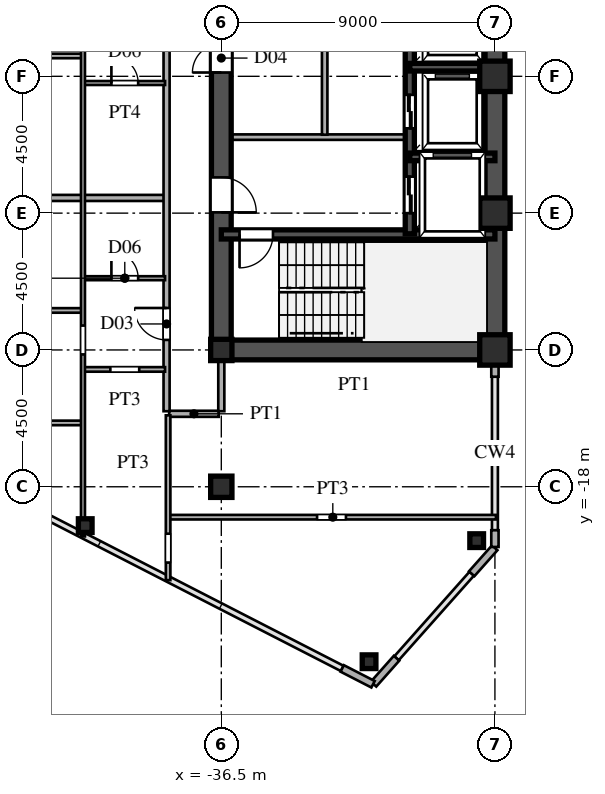
"""IFC4 building model, lengths in metres.
Left out: names, types, materials, properties, quantities, classifications, styles, units other than length and angle.
Written with IfcOpenShell. Run it as: python <this file> out.ifc"""

import sys

from ifc_helpers import new_model, si_unit, direction, frame, frame_2d, origin, origin_2d, place, context, subcontext, project, spatial, rectangle, hollow_rectangle, i_section, extrude, source, transform, mapped, element, fill, save


model = new_model("IFC4")
c1 = context("Model", 3, precision=1e-05, world=origin(), true_north=direction((0.0, 1.0)))
c2 = subcontext(c1, "Body", "Model", "MODEL_VIEW")
j1 = project(units=[si_unit("LENGTHUNIT", "METRE"), si_unit("PLANEANGLEUNIT", "RADIAN")], contexts=[c1])
p1 = place(None, origin())
s1 = spatial("IfcSite", under=j1, at=p1, CompositionType="ELEMENT")
p2 = place(p1, origin())
s2 = spatial("IfcBuilding", under=s1, at=p2, CompositionType="ELEMENT")
p3 = place(p2, frame((0.0, 0.0, 110.4)))
s3 = spatial("IfcBuildingStorey", under=s2, at=p3, CompositionType="ELEMENT", Elevation=110.4)
m1 = source(origin(), c2, "Body", "SweptSolid", [
    extrude(hollow_rectangle(XDim=1.0, YDim=1.0, WallThickness=0.042, at=origin_2d()), origin(), (0.0, 0.0, 1.0), 3.6),
])
for number, where, z_axis, x_axis in (
    (1, (-27.5, -13.5, 0.0), (0.0, 0.0, 1.0), (1.0, 0.0, 0.0)),
    (2, (-27.5, -9.0, 0.0), (0.0, 0.0, 1.0), (1.0, 0.0, 0.0)),
    (3, (-27.5, -4.5, 0.0), (0.0, 0.0, 1.0), (1.0, 0.0, 0.0)),
):
    element("IfcColumn", number, at=place(p3, frame(where, z_axis=z_axis, x_axis=x_axis)), inside=s3, PredefinedType="COLUMN", context=c2, shape_type="MappedRepresentation", body=[
        mapped(m1, transform((0.0, 0.0, 0.0), scale=1.0)),
    ])
m2 = source(origin(), c2, "Body", "SweptSolid", [
    extrude(i_section(OverallWidth=0.7, OverallDepth=0.7, WebThickness=0.028, FlangeThickness=0.045, at=origin_2d()), origin(), (0.0, 0.0, 1.0), 3.6),
])
for number, where, z_axis, x_axis in (
    (4, (-36.5, -18.0, 0.0), (0.0, 0.0, 1.0), (1.0, 0.0, 0.0)),
    (5, (-36.5, -13.5, 0.0), (0.0, 0.0, 1.0), (1.0, 0.0, 0.0)),
):
    element("IfcColumn", number, at=place(p3, frame(where, z_axis=z_axis, x_axis=x_axis)), inside=s3, PredefinedType="COLUMN", context=c2, shape_type="MappedRepresentation", body=[
        mapped(m2, transform((0.0, 0.0, 0.0), scale=1.0)),
    ])
m3 = source(origin(), c2, "Body", "SweptSolid", [
    extrude(hollow_rectangle(XDim=0.45, YDim=0.45, WallThickness=0.018, at=origin_2d()), origin(), (0.0, 0.0, 1.0), 3.6),
])
for number, where, z_axis, x_axis in (
    (6, (-28.1, -19.772, 0.0), (0.0, 0.0, 1.0), (1.0, 0.0, 0.0)),
    (7, (-31.64, -23.754, 0.0), (0.0, 0.0, 1.0), (1.0, 0.0, 0.0)),
    (8, (-40.976, -19.278, 0.0), (0.0, 0.0, 1.0), (1.0, 0.0, 0.0)),
):
    element("IfcColumn", number, at=place(p3, frame(where, z_axis=z_axis, x_axis=x_axis)), inside=s3, PredefinedType="COLUMN", context=c2, shape_type="MappedRepresentation", body=[
        mapped(m3, transform((0.0, 0.0, 0.0), scale=1.0)),
    ])
p4 = place(p3, frame((-27.5, -19.98, 0.0), z_axis=(0.0, 0.0, 1.0), x_axis=(0.0, 1.0, 0.0)))
e9 = element("IfcWall", 9, at=p4, inside=s3, PredefinedType="SOLIDWALL", context=c2, shape_type="SweptSolid", body=[
    extrude(rectangle(XDim=0.55, YDim=0.24, at=frame_2d((0.275, 0.0))), origin(), (0.0, 0.0, 1.0), 3.38),
])
p5 = place(p3, frame((-27.5, -14.38, 0.0), z_axis=(0.0, 0.0, 1.0), x_axis=(0.0, 1.0, 0.0)))
e10 = element("IfcWall", 10, at=p5, inside=s3, PredefinedType="SOLIDWALL", context=c2, shape_type="SweptSolid", body=[
    extrude(rectangle(XDim=0.55, YDim=0.24, at=frame_2d((0.275, 0.0))), origin(), (0.0, 0.0, 1.0), 2.88),
])
p6 = place(p3, frame((-32.523, -23.975, 0.0), z_axis=(0.0, 0.0, 1.0), x_axis=(0.889797395748, -0.456355776255, 0.0)))
e11 = element("IfcWall", 11, at=p6, inside=s3, PredefinedType="SOLIDWALL", context=c2, shape_type="SweptSolid", body=[
    extrude(rectangle(XDim=1.14, YDim=0.24, at=frame_2d((0.57, 0.0))), origin(), (0.0, 0.0, 1.0), 3.38),
])
for number, where, z_axis, x_axis in (
    (12, (-31.493, -24.492, 0.0), (0.0, 0.0, 1.0), (0.664, 0.747, 0.0)),
    (13, (-28.264, -20.86, 0.0), (0.0, 0.0, 1.0), (0.664, 0.747, 0.0)),
):
    element("IfcWall", number, at=place(p3, frame(where, z_axis=z_axis, x_axis=x_axis)), inside=s3, PredefinedType="SOLIDWALL", context=c2, shape_type="SweptSolid", body=[
        extrude(rectangle(XDim=1.14, YDim=0.24, at=frame_2d((0.57, 0.0))), origin(), (0.0, 0.0, 1.0), 3.38),
    ])
p7 = place(p3, frame((-27.5, -13.5, 0.0), z_axis=(0.0, 0.0, 1.0), x_axis=(0.0, 1.0, 0.0)))
e14 = element("IfcWall", 14, at=p7, inside=s3, PredefinedType="SHEAR", context=c2, shape_type="SweptSolid", body=[
    extrude(rectangle(XDim=12.2, YDim=0.65, at=frame_2d((6.1, 0.0))), origin(), (0.0, 0.0, 1.0), 3.38),
])
p8 = place(p3, frame((-36.5, -13.5, 0.0), z_axis=(0.0, 0.0, 1.0), x_axis=(1.0, 0.0, 0.0)))
e15 = element("IfcWall", 15, at=p8, inside=s3, PredefinedType="SHEAR", context=c2, shape_type="SweptSolid", body=[
    extrude(rectangle(XDim=9.0, YDim=0.65, at=frame_2d((4.5, 0.0))), origin(), (0.0, 0.0, 1.0), 3.38),
])
p9 = place(p3, frame((-36.5, -13.65, 0.0), z_axis=(0.0, 0.0, 1.0), x_axis=(0.0, 1.0, 0.0)))
e16 = element("IfcWall", 16, at=p9, inside=s3, PredefinedType="SHEAR", context=c2, shape_type="SweptSolid", body=[
    extrude(rectangle(XDim=7.15, YDim=0.65, at=frame_2d((3.575, 0.0))), origin(), (0.0, 0.0, 1.0), 3.38),
])
p10 = place(p9, frame((4.675, 0.0, 0.0)))
e17 = element("IfcOpeningElement", 17, at=p10, cuts=e16, PredefinedType="OPENING", context=c2, shape_type="SweptSolid", body=[
    extrude(rectangle(XDim=1.15, YDim=2.2, at=frame_2d((0.575, 1.1))), frame((0.0, 0.335, 0.0), z_axis=(0.0, -1.0, 0.0), x_axis=(1.0, 0.0, 0.0)), (0.0, 0.0, 1.0), 0.67),
])
p11 = place(p3, frame((-36.5, -6.5, 0.0), z_axis=(0.0, 0.0, 1.0), x_axis=(0.0, 1.0, 0.0)))
e18 = element("IfcWall", 18, at=p11, inside=s3, PredefinedType="SHEAR", context=c2, shape_type="SweptSolid", body=[
    extrude(rectangle(XDim=5.2, YDim=0.65, at=frame_2d((2.6, 0.0))), origin(), (0.0, 0.0, 1.0), 3.38),
])
p12 = place(p11, frame((2.125, 0.0, 0.0)))
e19 = element("IfcOpeningElement", 19, at=p12, cuts=e18, PredefinedType="OPENING", context=c2, shape_type="SweptSolid", body=[
    extrude(rectangle(XDim=0.95, YDim=2.15, at=frame_2d((0.475, 1.075))), frame((0.0, 0.335, 0.0), z_axis=(0.0, -1.0, 0.0), x_axis=(1.0, 0.0, 0.0)), (0.0, 0.0, 1.0), 0.67),
])
p13 = place(p3, frame((-36.5, -9.7, 0.0), z_axis=(0.0, 0.0, 1.0), x_axis=(1.0, 0.0, 0.0)))
e20 = element("IfcWall", 20, at=p13, inside=s3, PredefinedType="SHEAR", context=c2, shape_type="SweptSolid", body=[
    extrude(rectangle(XDim=9.0, YDim=0.3, at=frame_2d((4.5, 0.0))), origin(), (0.0, 0.0, 1.0), 3.38),
])
p14 = place(p13, frame((0.6, 0.0, 0.0)))
e21 = element("IfcOpeningElement", 21, at=p14, cuts=e20, PredefinedType="OPENING", context=c2, shape_type="SweptSolid", body=[
    extrude(rectangle(XDim=1.1, YDim=2.2, at=frame_2d((0.55, 1.1))), frame((0.0, 0.16, 0.0), z_axis=(0.0, -1.0, 0.0), x_axis=(1.0, 0.0, 0.0)), (0.0, 0.0, 1.0), 0.32),
])
for number, where, z_axis, x_axis in (
    (22, (-30.3, -7.15, 0.0), (0.0, 0.0, 1.0), (1.0, 0.0, 0.0)),
    (23, (-30.3, -4.2, 0.0), (0.0, 0.0, 1.0), (1.0, 0.0, 0.0)),
):
    element("IfcWall", number, at=place(p3, frame(where, z_axis=z_axis, x_axis=x_axis)), inside=s3, PredefinedType="SHEAR", context=c2, shape_type="SweptSolid", body=[
        extrude(rectangle(XDim=2.8, YDim=0.25, at=frame_2d((1.4, 0.0))), origin(), (0.0, 0.0, 1.0), 3.38),
    ])
p15 = place(p3, frame((-30.3, -9.68, 0.0), z_axis=(0.0, 0.0, 1.0), x_axis=(0.0, 1.0, 0.0)))
e24 = element("IfcWall", 24, at=p15, inside=s3, PredefinedType="SHEAR", context=c2, shape_type="SweptSolid", body=[
    extrude(rectangle(XDim=2.56, YDim=0.3, at=frame_2d((1.28, 0.0))), origin(), (0.0, 0.0, 1.0), 3.38),
])
p16 = place(p15, frame((0.68, 0.0, 0.0)))
e25 = element("IfcOpeningElement", 25, at=p16, cuts=e24, PredefinedType="OPENING", context=c2, shape_type="SweptSolid", body=[
    extrude(rectangle(XDim=1.2, YDim=2.25, at=frame_2d((0.6, 1.125))), frame((0.0, 0.16, 0.0), z_axis=(0.0, -1.0, 0.0), x_axis=(1.0, 0.0, 0.0)), (0.0, 0.0, 1.0), 0.32),
])
p17 = place(p3, frame((-30.3, -7.12, 0.0), z_axis=(0.0, 0.0, 1.0), x_axis=(0.0, 1.0, 0.0)))
e26 = element("IfcWall", 26, at=p17, inside=s3, PredefinedType="SHEAR", context=c2, shape_type="SweptSolid", body=[
    extrude(rectangle(XDim=2.92, YDim=0.3, at=frame_2d((1.46, 0.0))), origin(), (0.0, 0.0, 1.0), 3.38),
])
p18 = place(p17, frame((0.91, 0.0, 0.0)))
e27 = element("IfcOpeningElement", 27, at=p18, cuts=e26, PredefinedType="OPENING", context=c2, shape_type="SweptSolid", body=[
    extrude(rectangle(XDim=1.1, YDim=2.2, at=frame_2d((0.55, 1.1))), frame((0.0, 0.16, 0.0), z_axis=(0.0, -1.0, 0.0), x_axis=(1.0, 0.0, 0.0)), (0.0, 0.0, 1.0), 0.32),
])
p19 = place(p3, frame((-30.3, -4.2, 0.0), z_axis=(0.0, 0.0, 1.0), x_axis=(0.0, 1.0, 0.0)))
e28 = element("IfcWall", 28, at=p19, inside=s3, PredefinedType="SHEAR", context=c2, shape_type="SweptSolid", body=[
    extrude(rectangle(XDim=2.88, YDim=0.3, at=frame_2d((1.44, 0.0))), origin(), (0.0, 0.0, 1.0), 3.38),
])
p20 = place(p19, frame((0.89, 0.0, 0.0)))
e29 = element("IfcOpeningElement", 29, at=p20, cuts=e28, PredefinedType="OPENING", context=c2, shape_type="SweptSolid", body=[
    extrude(rectangle(XDim=1.1, YDim=2.2, at=frame_2d((0.55, 1.1))), frame((0.0, 0.16, 0.0), z_axis=(0.0, -1.0, 0.0), x_axis=(1.0, 0.0, 0.0)), (0.0, 0.0, 1.0), 0.32),
])
p21 = place(p3, frame((-36.15, -6.5, 0.0), z_axis=(0.0, 0.0, 1.0), x_axis=(1.0, 0.0, 0.0)))
e30 = element("IfcWall", 30, at=p21, inside=s3, PredefinedType="PARTITIONING", context=c2, shape_type="SweptSolid", body=[
    extrude(rectangle(XDim=5.7, YDim=0.18, at=frame_2d((2.85, 0.0))), origin(), (0.0, 0.0, 1.0), 3.38),
])
p22 = place(p3, frame((-33.1, -6.42, 0.0), z_axis=(0.0, 0.0, 1.0), x_axis=(0.0, 1.0, 0.0)))
e31 = element("IfcWall", 31, at=p22, inside=s3, PredefinedType="PARTITIONING", context=c2, shape_type="SweptSolid", body=[
    extrude(rectangle(XDim=5.04, YDim=0.18, at=frame_2d((2.52, 0.0))), origin(), (0.0, 0.0, 1.0), 3.38),
])
p23 = place(p3, frame((-38.2, -19.0, 0.0), z_axis=(0.0, 0.0, 1.0), x_axis=(1.0, 0.0, 0.0)))
e32 = element("IfcWall", 32, at=p23, inside=s3, PredefinedType="PARTITIONING", context=c2, shape_type="SweptSolid", body=[
    extrude(rectangle(XDim=10.735, YDim=0.15, at=frame_2d((5.367, 0.0))), origin(), (0.0, 0.0, 1.0), 3.38),
])
p24 = place(p23, frame((4.85, 0.0, 0.0)))
e33 = element("IfcOpeningElement", 33, at=p24, cuts=e32, PredefinedType="OPENING", context=c2, shape_type="SweptSolid", body=[
    extrude(rectangle(XDim=0.95, YDim=2.15, at=frame_2d((0.475, 1.075))), frame((0.0, 0.085, 0.0), z_axis=(0.0, -1.0, 0.0), x_axis=(1.0, 0.0, 0.0)), (0.0, 0.0, 1.0), 0.17),
])
p25 = place(p3, frame((-48.295, -15.9, 0.0), z_axis=(0.0, 0.0, 1.0), x_axis=(1.0, 0.0, 0.0)))
e34 = element("IfcWall", 34, at=p25, inside=s3, PredefinedType="PARTITIONING", context=c2, shape_type="SweptSolid", body=[
    extrude(rectangle(XDim=7.195, YDim=0.15, at=frame_2d((3.597, 0.0))), origin(), (0.0, 0.0, 1.0), 3.38),
])
p26 = place(p25, frame((3.165, 0.0, 0.0)))
e35 = element("IfcOpeningElement", 35, at=p26, cuts=e34, PredefinedType="OPENING", context=c2, shape_type="SweptSolid", body=[
    extrude(rectangle(XDim=0.95, YDim=2.15, at=frame_2d((0.475, 1.075))), frame((0.0, 0.085, 0.0), z_axis=(0.0, -1.0, 0.0), x_axis=(1.0, 0.0, 0.0)), (0.0, 0.0, 1.0), 0.17),
])
p27 = place(p3, frame((-38.215, -15.6, 0.0), z_axis=(0.0, 0.0, 1.0), x_axis=(1.0, 0.0, 0.0)))
e36 = element("IfcWall", 36, at=p27, inside=s3, PredefinedType="PARTITIONING", context=c2, shape_type="SweptSolid", body=[
    extrude(rectangle(XDim=1.63, YDim=0.2, at=frame_2d((0.815, 0.0))), origin(), (0.0, 0.0, 1.0), 3.38),
])
p28 = place(p3, frame((-41.0, -14.14, 0.0), z_axis=(0.0, 0.0, 1.0), x_axis=(1.0, 0.0, 0.0)))
e37 = element("IfcWall", 37, at=p28, inside=s3, PredefinedType="PARTITIONING", context=c2, shape_type="SweptSolid", body=[
    extrude(rectangle(XDim=2.65, YDim=0.15, at=frame_2d((1.325, 0.0))), origin(), (0.0, 0.0, 1.0), 3.38),
])
p29 = place(p28, frame((0.85, 0.0, 0.0)))
e38 = element("IfcOpeningElement", 38, at=p29, cuts=e37, PredefinedType="OPENING", context=c2, shape_type="SweptSolid", body=[
    extrude(rectangle(XDim=0.95, YDim=2.15, at=frame_2d((0.475, 1.075))), frame((0.0, 0.085, 0.0), z_axis=(0.0, -1.0, 0.0), x_axis=(1.0, 0.0, 0.0)), (0.0, 0.0, 1.0), 0.17),
])
p30 = place(p3, frame((-54.45, -12.2, 0.0), z_axis=(0.0, 0.0, 1.0), x_axis=(1.0, 0.0, 0.0)))
e39 = element("IfcWall", 39, at=p30, inside=s3, PredefinedType="PARTITIONING", context=c2, shape_type="SweptSolid", body=[
    extrude(rectangle(XDim=13.35, YDim=0.15, at=frame_2d((6.675, 0.0))), origin(), (0.0, 0.0, 1.0), 3.38),
])
p31 = place(p30, frame((6.2, 0.0, 0.0)))
e40 = element("IfcOpeningElement", 40, at=p31, cuts=e39, PredefinedType="OPENING", context=c2, shape_type="SweptSolid", body=[
    extrude(rectangle(XDim=0.95, YDim=2.15, at=frame_2d((0.475, 1.075))), frame((0.0, 0.085, 0.0), z_axis=(0.0, -1.0, 0.0), x_axis=(1.0, 0.0, 0.0)), (0.0, 0.0, 1.0), 0.17),
])
p32 = place(p3, frame((-41.0, -11.14, 0.0), z_axis=(0.0, 0.0, 1.0), x_axis=(1.0, 0.0, 0.0)))
e41 = element("IfcWall", 41, at=p32, inside=s3, PredefinedType="PARTITIONING", context=c2, shape_type="SweptSolid", body=[
    extrude(rectangle(XDim=2.65, YDim=0.13, at=frame_2d((1.325, 0.0))), origin(), (0.0, 0.0, 1.0), 3.38),
])
p33 = place(p32, frame((0.885, 0.0, 0.0)))
e42 = element("IfcOpeningElement", 42, at=p33, cuts=e41, PredefinedType="OPENING", context=c2, shape_type="SweptSolid", body=[
    extrude(rectangle(XDim=0.88, YDim=2.1, at=frame_2d((0.44, 1.05))), frame((0.0, 0.075, 0.0), z_axis=(0.0, -1.0, 0.0), x_axis=(1.0, 0.0, 0.0)), (0.0, 0.0, 1.0), 0.15),
])
p34 = place(p3, frame((-62.69, -8.5, 0.0), z_axis=(0.0, 0.0, 1.0), x_axis=(1.0, 0.0, 0.0)))
e43 = element("IfcWall", 43, at=p34, inside=s3, PredefinedType="PARTITIONING", context=c2, shape_type="SweptSolid", body=[
    extrude(rectangle(XDim=24.31, YDim=0.2, at=frame_2d((12.155, 0.0))), origin(), (0.0, 0.0, 1.0), 3.38),
])
p35 = place(p3, frame((-41.0, -4.72, 0.0), z_axis=(0.0, 0.0, 1.0), x_axis=(1.0, 0.0, 0.0)))
e44 = element("IfcWall", 44, at=p35, inside=s3, PredefinedType="PARTITIONING", context=c2, shape_type="SweptSolid", body=[
    extrude(rectangle(XDim=2.65, YDim=0.13, at=frame_2d((1.325, 0.0))), origin(), (0.0, 0.0, 1.0), 3.38),
])
p36 = place(p35, frame((0.885, 0.0, 0.0)))
e45 = element("IfcOpeningElement", 45, at=p36, cuts=e44, PredefinedType="OPENING", context=c2, shape_type="SweptSolid", body=[
    extrude(rectangle(XDim=0.88, YDim=2.1, at=frame_2d((0.44, 1.05))), frame((0.0, 0.075, 0.0), z_axis=(0.0, -1.0, 0.0), x_axis=(1.0, 0.0, 0.0)), (0.0, 0.0, 1.0), 0.15),
])
p37 = place(p3, frame((-69.535, -3.83, 0.0), z_axis=(0.0, 0.0, 1.0), x_axis=(1.0, 0.0, 0.0)))
e46 = element("IfcWall", 46, at=p37, inside=s3, PredefinedType="PARTITIONING", context=c2, shape_type="SweptSolid", body=[
    extrude(rectangle(XDim=28.435, YDim=0.15, at=frame_2d((14.217, 0.0))), origin(), (0.0, 0.0, 1.0), 3.38),
])
p38 = place(p37, frame((24.647, 0.0, 0.0)))
e47 = element("IfcOpeningElement", 47, at=p38, cuts=e46, PredefinedType="OPENING", context=c2, shape_type="SweptSolid", body=[
    extrude(rectangle(XDim=0.95, YDim=2.15, at=frame_2d((0.475, 1.075))), frame((0.0, 0.085, 0.0), z_axis=(0.0, -1.0, 0.0), x_axis=(1.0, 0.0, 0.0)), (0.0, 0.0, 1.0), 0.17),
])
p39 = place(p37, frame((11.71, 0.0, 0.0)))
e48 = element("IfcOpeningElement", 48, at=p39, cuts=e46, PredefinedType="OPENING", context=c2, shape_type="SweptSolid", body=[
    extrude(rectangle(XDim=0.95, YDim=2.15, at=frame_2d((0.475, 1.075))), frame((0.0, 0.085, 0.0), z_axis=(0.0, -1.0, 0.0), x_axis=(1.0, 0.0, 0.0)), (0.0, 0.0, 1.0), 0.17),
])
p40 = place(p3, frame((-41.05, -19.634, 0.0), z_axis=(0.0, 0.0, 1.0), x_axis=(0.0, 1.0, 0.0)))
e49 = element("IfcWall", 49, at=p40, inside=s3, PredefinedType="PARTITIONING", context=c2, shape_type="SweptSolid", body=[
    extrude(rectangle(XDim=20.417, YDim=0.13, at=frame_2d((10.208, 0.0))), origin(), (0.0, 0.0, 1.0), 2.99),
])
p41 = place(p40, frame((5.987, 0.0, 0.0)))
e50 = element("IfcOpeningElement", 50, at=p41, cuts=e49, PredefinedType="OPENING", context=c2, shape_type="SweptSolid", body=[
    extrude(rectangle(XDim=0.95, YDim=2.15, at=frame_2d((0.475, 1.075))), frame((0.0, 0.075, 0.0), z_axis=(0.0, -1.0, 0.0), x_axis=(1.0, 0.0, 0.0)), (0.0, 0.0, 1.0), 0.15),
])
p42 = place(p40, frame((17.659, 0.0, 0.0)))
e51 = element("IfcOpeningElement", 51, at=p42, cuts=e49, PredefinedType="OPENING", context=c2, shape_type="SweptSolid", body=[
    extrude(rectangle(XDim=0.95, YDim=2.15, at=frame_2d((0.475, 1.075))), frame((0.0, 0.075, 0.0), z_axis=(0.0, -1.0, 0.0), x_axis=(1.0, 0.0, 0.0)), (0.0, 0.0, 1.0), 0.15),
])
p43 = place(p3, frame((-38.3, -15.515, 0.0), z_axis=(0.0, 0.0, 1.0), x_axis=(0.0, 1.0, 0.0)))
e52 = element("IfcWall", 52, at=p43, inside=s3, PredefinedType="PARTITIONING", context=c2, shape_type="SweptSolid", body=[
    extrude(rectangle(XDim=31.03, YDim=0.2, at=frame_2d((15.515, 0.0))), origin(), (0.0, 0.0, 1.0), 3.38),
])
p44 = place(p43, frame((2.345, 0.0, 0.0)))
e53 = element("IfcOpeningElement", 53, at=p44, cuts=e52, PredefinedType="OPENING", context=c2, shape_type="SweptSolid", body=[
    extrude(rectangle(XDim=1.05, YDim=2.25, at=frame_2d((0.525, 1.125))), frame((0.0, 0.11, 0.0), z_axis=(0.0, -1.0, 0.0), x_axis=(1.0, 0.0, 0.0)), (0.0, 0.0, 1.0), 0.22),
])
p45 = place(p43, frame((13.28, 0.0, 0.0)))
e54 = element("IfcOpeningElement", 54, at=p45, cuts=e52, PredefinedType="OPENING", context=c2, shape_type="SweptSolid", body=[
    extrude(rectangle(XDim=1.05, YDim=2.25, at=frame_2d((0.525, 1.125))), frame((0.0, 0.11, 0.0), z_axis=(0.0, -1.0, 0.0), x_axis=(1.0, 0.0, 0.0)), (0.0, 0.0, 1.0), 0.22),
])
p46 = place(p43, frame((25.567, 0.0, 0.0)))
e55 = element("IfcOpeningElement", 55, at=p46, cuts=e52, PredefinedType="OPENING", context=c2, shape_type="SweptSolid", body=[
    extrude(rectangle(XDim=1.05, YDim=2.25, at=frame_2d((0.525, 1.125))), frame((0.0, 0.11, 0.0), z_axis=(0.0, -1.0, 0.0), x_axis=(1.0, 0.0, 0.0)), (0.0, 0.0, 1.0), 0.22),
])
p47 = place(p3, frame((-38.25, -21.071, 0.0), z_axis=(0.0, 0.0, 1.0), x_axis=(0.0, 1.0, 0.0)))
e56 = element("IfcWall", 56, at=p47, inside=s3, PredefinedType="PARTITIONING", context=c2, shape_type="SweptSolid", body=[
    extrude(rectangle(XDim=5.421, YDim=0.15, at=frame_2d((2.71, 0.0))), origin(), (0.0, 0.0, 1.0), 3.38),
])
p48 = place(p47, frame((0.578, 0.0, 0.0)))
e57 = element("IfcOpeningElement", 57, at=p48, cuts=e56, PredefinedType="OPENING", context=c2, shape_type="SweptSolid", body=[
    extrude(rectangle(XDim=0.95, YDim=2.15, at=frame_2d((0.475, 1.075))), frame((0.0, 0.085, 0.0), z_axis=(0.0, -1.0, 0.0), x_axis=(1.0, 0.0, 0.0)), (0.0, 0.0, 1.0), 0.17),
])
p49 = place(p3, frame((-36.5, -15.515, 0.0), z_axis=(0.0, 0.0, 1.0), x_axis=(0.0, 1.0, 0.0)))
e58 = element("IfcWall", 58, at=p49, inside=s3, PredefinedType="PARTITIONING", context=c2, shape_type="SweptSolid", body=[
    extrude(rectangle(XDim=1.685, YDim=0.2, at=frame_2d((0.842, 0.0))), origin(), (0.0, 0.0, 1.0), 2.78),
])
m4 = source(origin(), c2, "Body", "SweptSolid", [
    extrude(rectangle(XDim=1.15, YDim=2.2, at=frame_2d((0.575, 1.1))), frame((0.0, 0.025, 0.0), z_axis=(0.0, -1.0, 0.0), x_axis=(1.0, 0.0, 0.0)), (0.0, 0.0, 1.0), 0.05),
])
p50 = place(p10, frame((1.15, 0.0, 0.0), z_axis=(0.0, 0.0, 1.0), x_axis=(-1.0, 0.0, 0.0)))
e59 = element("IfcDoor", 59, at=p50, inside=s3, OperationType="SINGLE_SWING_LEFT", PredefinedType="DOOR", context=c2, shape_type="MappedRepresentation", body=[
    mapped(m4, transform((0.0, 0.0, 0.0), scale=1.0)),
])
fill(e17, e59)
m5 = source(origin(), c2, "Body", "SweptSolid", [
    extrude(rectangle(XDim=0.95, YDim=2.15, at=frame_2d((0.475, 1.075))), frame((0.0, 0.025, 0.0), z_axis=(0.0, -1.0, 0.0), x_axis=(1.0, 0.0, 0.0)), (0.0, 0.0, 1.0), 0.05),
])
p51 = place(p12, origin())
e60 = element("IfcDoor", 60, at=p51, inside=s3, OperationType="SINGLE_SWING_LEFT", PredefinedType="DOOR", context=c2, shape_type="MappedRepresentation", body=[
    mapped(m5, transform((0.0, 0.0, 0.0), scale=1.0)),
])
fill(e19, e60)
m6 = source(origin(), c2, "Body", "SweptSolid", [
    extrude(rectangle(XDim=1.1, YDim=2.2, at=frame_2d((0.55, 1.1))), frame((0.0, 0.025, 0.0), z_axis=(0.0, -1.0, 0.0), x_axis=(1.0, 0.0, 0.0)), (0.0, 0.0, 1.0), 0.05),
])
p52 = place(p14, frame((1.1, 0.0, 0.0), z_axis=(0.0, 0.0, 1.0), x_axis=(-1.0, 0.0, 0.0)))
e61 = element("IfcDoor", 61, at=p52, inside=s3, OperationType="SINGLE_SWING_LEFT", PredefinedType="DOOR", context=c2, shape_type="MappedRepresentation", body=[
    mapped(m6, transform((0.0, 0.0, 0.0), scale=1.0)),
])
fill(e21, e61)
m7 = source(origin(), c2, "Body", "SweptSolid", [
    extrude(rectangle(XDim=1.2, YDim=2.25, at=frame_2d((0.6, 1.125))), frame((0.0, 0.025, 0.0), z_axis=(0.0, -1.0, 0.0), x_axis=(1.0, 0.0, 0.0)), (0.0, 0.0, 1.0), 0.05),
])
p53 = place(p16, origin())
e62 = element("IfcDoor", 62, at=p53, inside=s3, OperationType="DOUBLE_DOOR_SLIDING", PredefinedType="DOOR", context=c2, shape_type="MappedRepresentation", body=[
    mapped(m7, transform((0.0, 0.0, 0.0), scale=1.0)),
])
fill(e25, e62)
m8 = source(origin(), c2, "Body", "SweptSolid", [
    extrude(rectangle(XDim=1.1, YDim=2.2, at=frame_2d((0.55, 1.1))), frame((0.0, 0.025, 0.0), z_axis=(0.0, -1.0, 0.0), x_axis=(1.0, 0.0, 0.0)), (0.0, 0.0, 1.0), 0.05),
])
p54 = place(p18, origin())
e63 = element("IfcDoor", 63, at=p54, inside=s3, OperationType="DOUBLE_DOOR_SLIDING", PredefinedType="DOOR", context=c2, shape_type="MappedRepresentation", body=[
    mapped(m8, transform((0.0, 0.0, 0.0), scale=1.0)),
])
fill(e27, e63)
m9 = source(origin(), c2, "Body", "SweptSolid", [
    extrude(rectangle(XDim=0.88, YDim=2.1, at=frame_2d((0.44, 1.05))), frame((0.0, 0.025, 0.0), z_axis=(0.0, -1.0, 0.0), x_axis=(1.0, 0.0, 0.0)), (0.0, 0.0, 1.0), 0.05),
])
p55 = place(p33, origin())
e64 = element("IfcDoor", 64, at=p55, inside=s3, OperationType="SINGLE_SWING_LEFT", PredefinedType="DOOR", context=c2, shape_type="MappedRepresentation", body=[
    mapped(m9, transform((0.0, 0.0, 0.0), scale=1.0)),
])
fill(e42, e64)
p56 = place(p36, origin())
e65 = element("IfcDoor", 65, at=p56, inside=s3, OperationType="SINGLE_SWING_LEFT", PredefinedType="DOOR", context=c2, shape_type="MappedRepresentation", body=[
    mapped(m9, transform((0.0, 0.0, 0.0), scale=1.0)),
])
fill(e45, e65)
m10 = source(origin(), c2, "Body", "SweptSolid", [
    extrude(rectangle(XDim=1.05, YDim=2.25, at=frame_2d((0.525, 1.125))), frame((0.0, 0.025, 0.0), z_axis=(0.0, -1.0, 0.0), x_axis=(1.0, 0.0, 0.0)), (0.0, 0.0, 1.0), 0.05),
])
p57 = place(p44, origin())
e66 = element("IfcDoor", 66, at=p57, inside=s3, OperationType="SINGLE_SWING_RIGHT", PredefinedType="DOOR", context=c2, shape_type="MappedRepresentation", body=[
    mapped(m10, transform((0.0, 0.0, 0.0), scale=1.0)),
])
fill(e53, e66)
save(model, sys.argv[1])
